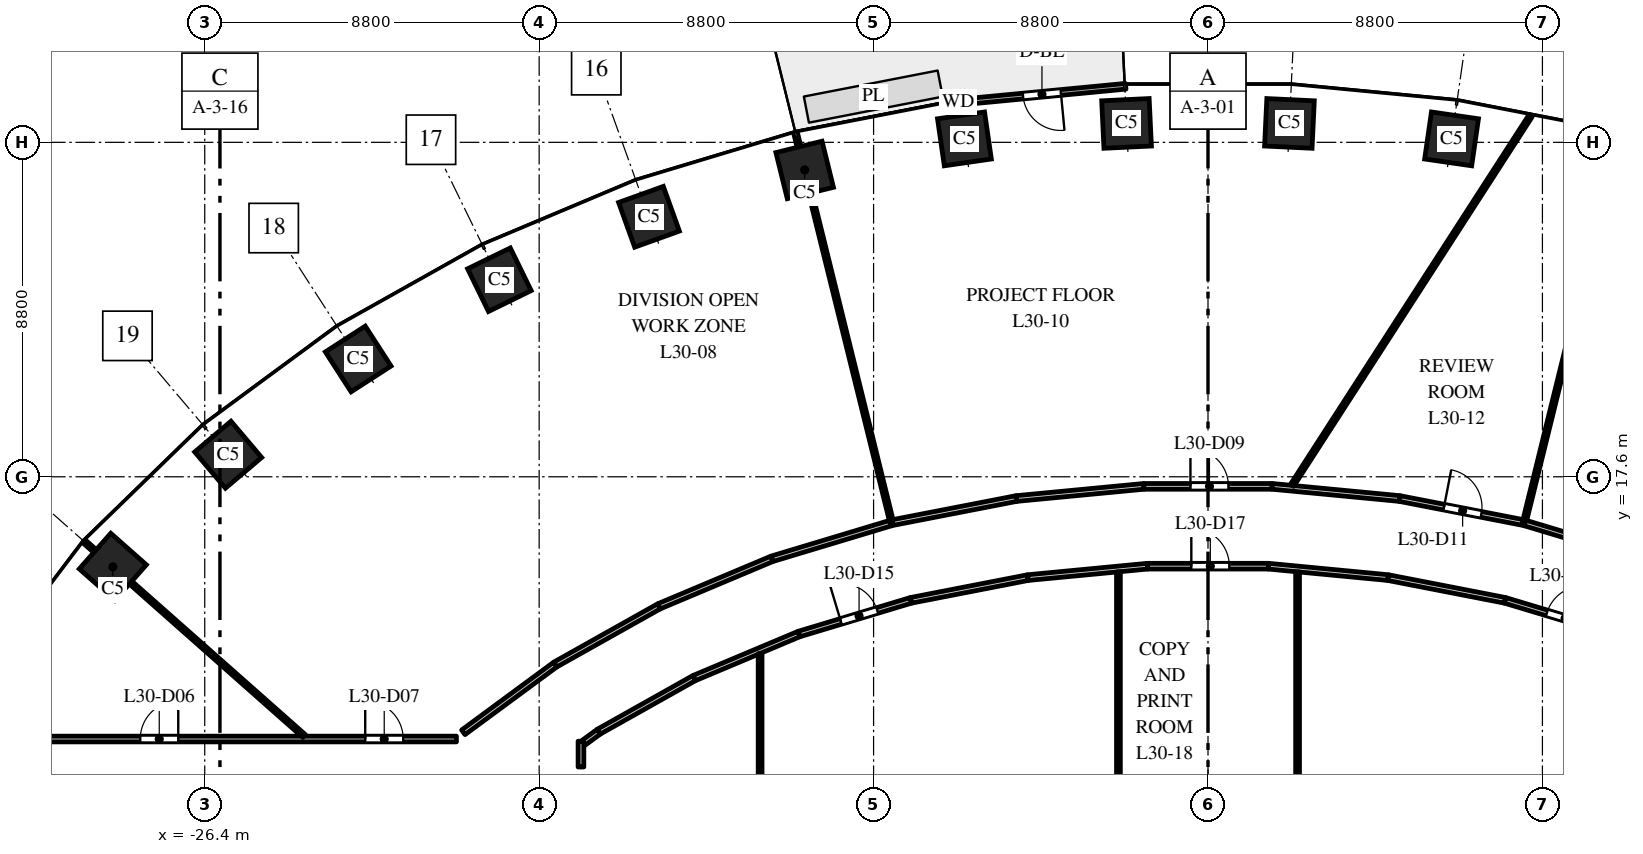
"""IFC4 building model, lengths in metres.
Left out: names, types, materials, properties, quantities, classifications, styles, units other than length and angle.
Written with IfcOpenShell. Run it as: python <this file> out.ifc"""

import sys

from ifc_helpers import new_model, si_unit, direction, frame, frame_2d, origin, origin_2d, place, context, subcontext, project, spatial, rectangle, extrude, element, fill, save


model = new_model("IFC4")
c1 = context("Model", 3, precision=1e-05, world=origin(), true_north=direction((0.0, 1.0)))
c2 = subcontext(c1, "Body", "Model", "MODEL_VIEW")
j1 = project(units=[si_unit("LENGTHUNIT", "METRE"), si_unit("PLANEANGLEUNIT", "RADIAN")], contexts=[c1])
p1 = place(None, origin())
s1 = spatial("IfcSite", under=j1, at=p1, CompositionType="ELEMENT")
p2 = place(p1, origin())
s2 = spatial("IfcBuilding", under=s1, at=p2, CompositionType="ELEMENT")
p3 = place(p2, frame((0.0, 0.0, 132.0)))
s3 = spatial("IfcBuildingStorey", under=s2, at=p3, CompositionType="ELEMENT", Elevation=132.0)
for number, where, z_axis, x_axis in (
    (1, (6.409, 26.491, 0.0), (0.0, 0.0, 1.0), (-0.99, 0.143, 0.0)),
    (2, (2.143, 26.898, 0.0), (0.0, 0.0, 1.0), (-0.999, 0.048, 0.0)),
    (3, (-2.143, 26.898, 0.0), (0.0, 0.0, 1.0), (-0.999, -0.048, 0.0)),
    (4, (-6.409, 26.491, 0.0), (0.0, 0.0, 1.0), (-0.99, -0.143, 0.0)),
    (5, (-10.613, 25.674, 0.0), (0.0, 0.0, 1.0), (-0.971, -0.24, 0.0)),
    (6, (-14.709, 24.441, 0.0), (0.0, 0.0, 1.0), (-0.941, -0.338, 0.0)),
    (7, (-18.646, 22.785, 0.0), (0.0, 0.0, 1.0), (-0.898, -0.439, 0.0)),
    (8, (-22.362, 20.7, 0.0), (0.0, 0.0, 1.0), (-0.84, -0.542, 0.0)),
    (9, (-25.783, 18.18, 0.0), (0.0, 0.0, 1.0), (-0.763, -0.646, 0.0)),
    (10, (-28.819, 15.23, 0.0), (0.0, 0.0, 1.0), (-0.663, -0.749, 0.0)),
):
    element("IfcColumn", number, at=place(p3, frame(where, z_axis=z_axis, x_axis=x_axis)), inside=s3, PredefinedType="COLUMN", context=c2, shape_type="SweptSolid", body=[
        extrude(rectangle(XDim=1.25, YDim=1.25, at=origin_2d()), origin(), (0.0, 0.0, 1.0), 4.0),
    ])
p4 = place(p3, frame((-2.166, 27.875, 0.0), z_axis=(0.0, 0.0, 1.0), x_axis=(-0.995473879823, -0.095035543824, 0.0)))
e11 = element("IfcWall", 11, at=p4, inside=s3, PredefinedType="STANDARD", context=c2, shape_type="SweptSolid", body=[
    extrude(rectangle(XDim=4.426, YDim=0.15, at=frame_2d((2.213, 0.0))), origin(), (0.0, 0.0, 1.0), 3.7),
])
p5 = place(p4, frame((1.713, 0.0, 0.0)))
e12 = element("IfcOpeningElement", 12, at=p5, cuts=e11, PredefinedType="OPENING", context=c2, shape_type="SweptSolid", body=[
    extrude(rectangle(XDim=1.0, YDim=2.4, at=frame_2d((0.5, 1.2))), frame((0.0, 0.085, 0.0), z_axis=(0.0, -1.0, 0.0), x_axis=(1.0, 0.0, 0.0)), (0.0, 0.0, 1.0), 0.17),
])
p6 = place(p3, frame((-31.5, 10.7, 0.0), z_axis=(0.0, 0.0, 1.0), x_axis=(1.0, 0.0, 0.0)))
e13 = element("IfcWall", 13, at=p6, inside=s3, PredefinedType="PARTITIONING", context=c2, shape_type="SweptSolid", body=[
    extrude(rectangle(XDim=11.723, YDim=0.15, at=frame_2d((5.861, 0.0))), origin(), (0.0, 0.0, 1.0), 3.1),
])
p7 = place(p6, frame((3.403, 0.0, 0.0)))
e14 = element("IfcOpeningElement", 14, at=p7, cuts=e13, PredefinedType="OPENING", context=c2, shape_type="SweptSolid", body=[
    extrude(rectangle(XDim=1.0, YDim=2.1, at=frame_2d((0.5, 1.05))), frame((0.0, 0.085, 0.0), z_axis=(0.0, -1.0, 0.0), x_axis=(1.0, 0.0, 0.0)), (0.0, 0.0, 1.0), 0.17),
])
p8 = place(p6, frame((9.323, 0.0, 0.0)))
e15 = element("IfcOpeningElement", 15, at=p8, cuts=e13, PredefinedType="OPENING", context=c2, shape_type="SweptSolid", body=[
    extrude(rectangle(XDim=1.0, YDim=2.1, at=frame_2d((0.5, 1.05))), frame((0.0, 0.085, 0.0), z_axis=(0.0, -1.0, 0.0), x_axis=(1.0, 0.0, 0.0)), (0.0, 0.0, 1.0), 0.17),
])
p9 = place(p3, frame((-29.569, 15.895, 0.0), z_axis=(0.0, 0.0, 1.0), x_axis=(0.748985701008, -0.662586160198, 0.0)))
e16 = element("IfcWall", 16, at=p9, inside=s3, PredefinedType="PARTITIONING", context=c2, shape_type="SweptSolid", body=[
    extrude(rectangle(XDim=7.723, YDim=0.1, at=frame_2d((3.861, 0.0))), origin(), (0.0, 0.0, 1.0), 2.9),
])
p10 = place(p3, frame((-19.595, 10.877, 0.0), z_axis=(0.0, 0.0, 1.0), x_axis=(0.805151708762, 0.593068904831, 0.0)))
e17 = element("IfcWall", 17, at=p10, inside=s3, PredefinedType="PARTITIONING", context=c2, shape_type="SweptSolid", body=[
    extrude(rectangle(XDim=3.008, YDim=0.15, at=frame_2d((1.504, 0.0))), origin(), (0.0, 0.0, 1.0), 2.75),
])
p11 = place(p3, frame((-17.173, 12.661, 0.0), z_axis=(0.0, 0.0, 1.0), x_axis=(0.872054495499, 0.489408783003, 0.0)))
e18 = element("IfcWall", 18, at=p11, inside=s3, PredefinedType="PARTITIONING", context=c2, shape_type="SweptSolid", body=[
    extrude(rectangle(XDim=3.128, YDim=0.15, at=frame_2d((1.564, 0.0))), origin(), (0.0, 0.0, 1.0), 3.7),
])
p12 = place(p3, frame((-16.5, 9.964, 0.0), z_axis=(0.0, 0.0, 1.0), x_axis=(0.0, 1.0, 0.0)))
e19 = element("IfcWall", 19, at=p12, inside=s3, PredefinedType="PARTITIONING", context=c2, shape_type="SweptSolid", body=[
    extrude(rectangle(XDim=0.678, YDim=0.15, at=frame_2d((0.339, 0.0))), origin(), (0.0, 0.0, 1.0), 3.7),
])
p13 = place(p3, frame((-16.425, 10.604, 0.0), z_axis=(0.0, 0.0, 1.0), x_axis=(0.805608867586, 0.592447763492, 0.0)))
e20 = element("IfcWall", 20, at=p13, inside=s3, PredefinedType="PARTITIONING", context=c2, shape_type="SweptSolid", body=[
    extrude(rectangle(XDim=0.488, YDim=0.15, at=frame_2d((0.244, 0.0))), origin(), (0.0, 0.0, 1.0), 3.7),
])
p14 = place(p3, frame((-16.032, 10.893, 0.0), z_axis=(0.0, 0.0, 1.0), x_axis=(0.871948863789, 0.489596955604, 0.0)))
e21 = element("IfcWall", 21, at=p14, inside=s3, PredefinedType="PARTITIONING", context=c2, shape_type="SweptSolid", body=[
    extrude(rectangle(XDim=2.88, YDim=0.15, at=frame_2d((1.44, 0.0))), origin(), (0.0, 0.0, 1.0), 2.75),
])
p15 = place(p3, frame((-14.445, 14.192, 0.0), z_axis=(0.0, 0.0, 1.0), x_axis=(0.921794929211, 0.387677841101, 0.0)))
e22 = element("IfcWall", 22, at=p15, inside=s3, PredefinedType="PARTITIONING", context=c2, shape_type="SweptSolid", body=[
    extrude(rectangle(XDim=3.224, YDim=0.15, at=frame_2d((1.612, 0.0))), origin(), (0.0, 0.0, 1.0), 2.85),
])
p16 = place(p3, frame((-13.521, 12.303, 0.0), z_axis=(0.0, 0.0, 1.0), x_axis=(0.921848667289, 0.387550041438, 0.0)))
e23 = element("IfcWall", 23, at=p16, inside=s3, PredefinedType="PARTITIONING", context=c2, shape_type="SweptSolid", body=[
    extrude(rectangle(XDim=2.993, YDim=0.15, at=frame_2d((1.497, 0.0))), origin(), (0.0, 0.0, 1.0), 2.85),
])
p17 = place(p3, frame((-11.786, -12.947, 0.0), z_axis=(0.0, 0.0, 1.0), x_axis=(0.0, 1.0, 0.0)))
e24 = element("IfcWall", 24, at=p17, inside=s3, PredefinedType="PARTITIONING", context=c2, shape_type="SweptSolid", body=[
    extrude(rectangle(XDim=25.894, YDim=0.1, at=frame_2d((12.947, 0.0))), origin(), (0.0, 0.0, 1.0), 2.75),
])
p18 = place(p3, frame((-11.473, 15.442, 0.0), z_axis=(0.0, 0.0, 1.0), x_axis=(0.957575426962, 0.288182757429, 0.0)))
e25 = element("IfcWall", 25, at=p18, inside=s3, PredefinedType="PARTITIONING", context=c2, shape_type="SweptSolid", body=[
    extrude(rectangle(XDim=3.273, YDim=0.15, at=frame_2d((1.636, 0.0))), origin(), (0.0, 0.0, 1.0), 3.7),
])
p19 = place(p3, frame((-10.853, 26.646, 0.0), z_axis=(0.0, 0.0, 1.0), x_axis=(0.239771193985, -0.970829426076, 0.0)))
e26 = element("IfcWall", 26, at=p19, inside=s3, PredefinedType="PARTITIONING", context=c2, shape_type="SweptSolid", body=[
    extrude(rectangle(XDim=10.56, YDim=0.1, at=frame_2d((5.28, 0.0))), origin(), (0.0, 0.0, 1.0), 2.85),
])
p20 = place(p3, frame((-10.762, 13.463, 0.0), z_axis=(0.0, 0.0, 1.0), x_axis=(0.957609782402, 0.288068576292, 0.0)))
e27 = element("IfcWall", 27, at=p20, inside=s3, PredefinedType="PARTITIONING", context=c2, shape_type="SweptSolid", body=[
    extrude(rectangle(XDim=3.076, YDim=0.15, at=frame_2d((1.538, 0.0))), origin(), (0.0, 0.0, 1.0), 3.7),
])
p21 = place(p20, frame((1.15, 0.0, 0.0)))
e28 = element("IfcOpeningElement", 28, at=p21, cuts=e27, PredefinedType="OPENING", context=c2, shape_type="SweptSolid", body=[
    extrude(rectangle(XDim=1.0, YDim=2.1, at=frame_2d((0.5, 1.05))), frame((0.0, 0.085, 0.0), z_axis=(0.0, -1.0, 0.0), x_axis=(1.0, 0.0, 0.0)), (0.0, 0.0, 1.0), 0.17),
])
p22 = place(p3, frame((-8.301, 16.395, 0.0), z_axis=(0.0, 0.0, 1.0), x_axis=(0.98166242116, 0.19062762361, 0.0)))
e29 = element("IfcWall", 29, at=p22, inside=s3, PredefinedType="PARTITIONING", context=c2, shape_type="SweptSolid", body=[
    extrude(rectangle(XDim=3.321, YDim=0.15, at=frame_2d((1.66, 0.0))), origin(), (0.0, 0.0, 1.0), 2.85),
])
p23 = place(p3, frame((-7.816, 14.349, 0.0), z_axis=(0.0, 0.0, 1.0), x_axis=(0.981627147181, 0.190809181955, 0.0)))
e30 = element("IfcWall", 30, at=p23, inside=s3, PredefinedType="PARTITIONING", context=c2, shape_type="SweptSolid", body=[
    extrude(rectangle(XDim=3.134, YDim=0.15, at=frame_2d((1.567, 0.0))), origin(), (0.0, 0.0, 1.0), 2.85),
])
p24 = place(p3, frame((-5.041, 17.028, 0.0), z_axis=(0.0, 0.0, 1.0), x_axis=(0.99548178004, 0.094952754613, 0.0)))
e31 = element("IfcWall", 31, at=p24, inside=s3, PredefinedType="PARTITIONING", context=c2, shape_type="SweptSolid", body=[
    extrude(rectangle(XDim=3.368, YDim=0.15, at=frame_2d((1.684, 0.0))), origin(), (0.0, 0.0, 1.0), 3.7),
])
p25 = place(p3, frame((-4.74, 14.947, 0.0), z_axis=(0.0, 0.0, 1.0), x_axis=(0.995467349369, 0.095103923894, 0.0)))
e32 = element("IfcWall", 32, at=p25, inside=s3, PredefinedType="PARTITIONING", context=c2, shape_type="SweptSolid", body=[
    extrude(rectangle(XDim=3.165, YDim=0.15, at=frame_2d((1.583, 0.0))), origin(), (0.0, 0.0, 1.0), 3.7),
])
p26 = place(p3, frame((-2.357, 7.21, 0.0), z_axis=(0.0, 0.0, 1.0), x_axis=(0.0, 1.0, 0.0)))
e33 = element("IfcWall", 33, at=p26, inside=s3, PredefinedType="PARTITIONING", context=c2, shape_type="SweptSolid", body=[
    extrude(rectangle(XDim=7.886, YDim=0.1, at=frame_2d((3.943, 0.0))), origin(), (0.0, 0.0, 1.0), 2.9),
])
p27 = place(p3, frame((-1.688, 17.348, 0.0), z_axis=(0.0, 0.0, 1.0), x_axis=(1.0, 0.0, 0.0)))
e34 = element("IfcWall", 34, at=p27, inside=s3, PredefinedType="PARTITIONING", context=c2, shape_type="SweptSolid", body=[
    extrude(rectangle(XDim=3.376, YDim=0.15, at=frame_2d((1.688, 0.0))), origin(), (0.0, 0.0, 1.0), 2.85),
])
p28 = place(p27, frame((1.226, 0.0, 0.0)))
e35 = element("IfcOpeningElement", 35, at=p28, cuts=e34, PredefinedType="OPENING", context=c2, shape_type="SweptSolid", body=[
    extrude(rectangle(XDim=1.0, YDim=2.1, at=frame_2d((0.5, 1.05))), frame((0.0, 0.085, 0.0), z_axis=(0.0, -1.0, 0.0), x_axis=(1.0, 0.0, 0.0)), (0.0, 0.0, 1.0), 0.17),
])
p29 = place(p3, frame((-1.589, 15.248, 0.0), z_axis=(0.0, 0.0, 1.0), x_axis=(1.0, 0.0, 0.0)))
e36 = element("IfcWall", 36, at=p29, inside=s3, PredefinedType="PARTITIONING", context=c2, shape_type="SweptSolid", body=[
    extrude(rectangle(XDim=3.178, YDim=0.15, at=frame_2d((1.589, 0.0))), origin(), (0.0, 0.0, 1.0), 2.85),
])
p30 = place(p29, frame((1.15, 0.0, 0.0)))
e37 = element("IfcOpeningElement", 37, at=p30, cuts=e36, PredefinedType="OPENING", context=c2, shape_type="SweptSolid", body=[
    extrude(rectangle(XDim=1.0, YDim=2.1, at=frame_2d((0.5, 1.05))), frame((0.0, 0.085, 0.0), z_axis=(0.0, -1.0, 0.0), x_axis=(1.0, 0.0, 0.0)), (0.0, 0.0, 1.0), 0.17),
])
p31 = place(p3, frame((1.589, 15.248, 0.0), z_axis=(0.0, 0.0, 1.0), x_axis=(0.995467349369, -0.095103923894, 0.0)))
e38 = element("IfcWall", 38, at=p31, inside=s3, PredefinedType="PARTITIONING", context=c2, shape_type="SweptSolid", body=[
    extrude(rectangle(XDim=3.165, YDim=0.15, at=frame_2d((1.583, 0.0))), origin(), (0.0, 0.0, 1.0), 2.85),
])
p32 = place(p3, frame((1.688, 17.348, 0.0), z_axis=(0.0, 0.0, 1.0), x_axis=(0.99548178004, -0.094952754613, 0.0)))
e39 = element("IfcWall", 39, at=p32, inside=s3, PredefinedType="PARTITIONING", context=c2, shape_type="SweptSolid", body=[
    extrude(rectangle(XDim=3.368, YDim=0.15, at=frame_2d((1.684, 0.0))), origin(), (0.0, 0.0, 1.0), 2.85),
])
p33 = place(p3, frame((2.212, 17.374, 0.0), z_axis=(0.0, 0.0, 1.0), x_axis=(0.542286762482, 0.840193470123, 0.0)))
e40 = element("IfcWall", 40, at=p33, inside=s3, PredefinedType="PARTITIONING", context=c2, shape_type="SweptSolid", body=[
    extrude(rectangle(XDim=11.581, YDim=0.1, at=frame_2d((5.79, 0.0))), origin(), (0.0, 0.0, 1.0), 2.85),
])
p34 = place(p3, frame((2.357, 7.21, 0.0), z_axis=(0.0, 0.0, 1.0), x_axis=(0.0, 1.0, 0.0)))
e41 = element("IfcWall", 41, at=p34, inside=s3, PredefinedType="PARTITIONING", context=c2, shape_type="SweptSolid", body=[
    extrude(rectangle(XDim=7.886, YDim=0.1, at=frame_2d((3.943, 0.0))), origin(), (0.0, 0.0, 1.0), 2.85),
])
p35 = place(p3, frame((4.74, 14.947, 0.0), z_axis=(0.0, 0.0, 1.0), x_axis=(0.981627147181, -0.190809181955, 0.0)))
e42 = element("IfcWall", 42, at=p35, inside=s3, PredefinedType="PARTITIONING", context=c2, shape_type="SweptSolid", body=[
    extrude(rectangle(XDim=3.134, YDim=0.15, at=frame_2d((1.567, 0.0))), origin(), (0.0, 0.0, 1.0), 3.7),
])
p36 = place(p3, frame((5.041, 17.028, 0.0), z_axis=(0.0, 0.0, 1.0), x_axis=(0.98166242116, -0.19062762361, 0.0)))
e43 = element("IfcWall", 43, at=p36, inside=s3, PredefinedType="PARTITIONING", context=c2, shape_type="SweptSolid", body=[
    extrude(rectangle(XDim=3.321, YDim=0.15, at=frame_2d((1.66, 0.0))), origin(), (0.0, 0.0, 1.0), 3.7),
])
p37 = place(p36, frame((1.19, 0.0, 0.0)))
e44 = element("IfcOpeningElement", 44, at=p37, cuts=e43, PredefinedType="OPENING", context=c2, shape_type="SweptSolid", body=[
    extrude(rectangle(XDim=1.0, YDim=2.1, at=frame_2d((0.5, 1.05))), frame((0.0, 0.085, 0.0), z_axis=(0.0, -1.0, 0.0), x_axis=(1.0, 0.0, 0.0)), (0.0, 0.0, 1.0), 0.17),
])
p38 = place(p3, frame((7.816, 14.349, 0.0), z_axis=(0.0, 0.0, 1.0), x_axis=(0.957609782402, -0.288068576292, 0.0)))
e45 = element("IfcWall", 45, at=p38, inside=s3, PredefinedType="PARTITIONING", context=c2, shape_type="SweptSolid", body=[
    extrude(rectangle(XDim=3.076, YDim=0.15, at=frame_2d((1.538, 0.0))), origin(), (0.0, 0.0, 1.0), 2.85),
])
p39 = place(p38, frame((1.15, 0.0, 0.0)))
e46 = element("IfcOpeningElement", 46, at=p39, cuts=e45, PredefinedType="OPENING", context=c2, shape_type="SweptSolid", body=[
    extrude(rectangle(XDim=1.0, YDim=2.1, at=frame_2d((0.5, 1.05))), frame((0.0, 0.085, 0.0), z_axis=(0.0, -1.0, 0.0), x_axis=(1.0, 0.0, 0.0)), (0.0, 0.0, 1.0), 0.17),
])
p40 = place(p3, frame((8.321, 16.394, 0.0), z_axis=(0.0, 0.0, 1.0), x_axis=(0.239771193985, 0.970829426076, 0.0)))
e47 = element("IfcWall", 47, at=p40, inside=s3, PredefinedType="PARTITIONING", context=c2, shape_type="SweptSolid", body=[
    extrude(rectangle(XDim=10.56, YDim=0.1, at=frame_2d((5.28, 0.0))), origin(), (0.0, 0.0, 1.0), 2.9),
])
p41 = place(p3, frame((8.339, 16.385, 0.0), z_axis=(0.0, 0.0, 1.0), x_axis=(0.957575426962, -0.288182757429, 0.0)))
e48 = element("IfcWall", 48, at=p41, inside=s3, PredefinedType="PARTITIONING", context=c2, shape_type="SweptSolid", body=[
    extrude(rectangle(XDim=3.273, YDim=0.15, at=frame_2d((1.636, 0.0))), origin(), (0.0, 0.0, 1.0), 2.85),
])
p42 = place(p5, origin())
e49 = element("IfcDoor", 49, at=p42, inside=s3, OperationType="SINGLE_SWING_LEFT", PredefinedType="DOOR", context=c2, shape_type="SweptSolid", body=[
    extrude(rectangle(XDim=1.0, YDim=2.4, at=frame_2d((0.5, 1.2))), frame((0.0, 0.025, 0.0), z_axis=(0.0, -1.0, 0.0), x_axis=(1.0, 0.0, 0.0)), (0.0, 0.0, 1.0), 0.05),
])
fill(e12, e49)
p43 = place(p7, origin())
e50 = element("IfcDoor", 50, at=p43, inside=s3, OperationType="SINGLE_SWING_RIGHT", PredefinedType="DOOR", context=c2, shape_type="SweptSolid", body=[
    extrude(rectangle(XDim=1.0, YDim=2.1, at=frame_2d((0.5, 1.05))), frame((0.0, 0.025, 0.0), z_axis=(0.0, -1.0, 0.0), x_axis=(1.0, 0.0, 0.0)), (0.0, 0.0, 1.0), 0.05),
])
fill(e14, e50)
p44 = place(p8, origin())
e51 = element("IfcDoor", 51, at=p44, inside=s3, OperationType="SINGLE_SWING_LEFT", PredefinedType="DOOR", context=c2, shape_type="SweptSolid", body=[
    extrude(rectangle(XDim=1.0, YDim=2.1, at=frame_2d((0.5, 1.05))), frame((0.0, 0.025, 0.0), z_axis=(0.0, -1.0, 0.0), x_axis=(1.0, 0.0, 0.0)), (0.0, 0.0, 1.0), 0.05),
])
fill(e15, e51)
p45 = place(p28, origin())
e52 = element("IfcDoor", 52, at=p45, inside=s3, OperationType="SINGLE_SWING_LEFT", PredefinedType="DOOR", context=c2, shape_type="SweptSolid", body=[
    extrude(rectangle(XDim=1.0, YDim=2.1, at=frame_2d((0.5, 1.05))), frame((0.0, 0.025, 0.0), z_axis=(0.0, -1.0, 0.0), x_axis=(1.0, 0.0, 0.0)), (0.0, 0.0, 1.0), 0.05),
])
fill(e35, e52)
p46 = place(p37, origin())
e53 = element("IfcDoor", 53, at=p46, inside=s3, OperationType="SINGLE_SWING_LEFT", PredefinedType="DOOR", context=c2, shape_type="SweptSolid", body=[
    extrude(rectangle(XDim=1.0, YDim=2.1, at=frame_2d((0.5, 1.05))), frame((0.0, 0.025, 0.0), z_axis=(0.0, -1.0, 0.0), x_axis=(1.0, 0.0, 0.0)), (0.0, 0.0, 1.0), 0.05),
])
fill(e44, e53)
p47 = place(p21, origin())
e54 = element("IfcDoor", 54, at=p47, inside=s3, OperationType="SINGLE_SWING_LEFT", PredefinedType="DOOR", context=c2, shape_type="SweptSolid", body=[
    extrude(rectangle(XDim=1.0, YDim=2.1, at=frame_2d((0.5, 1.05))), frame((0.0, 0.025, 0.0), z_axis=(0.0, -1.0, 0.0), x_axis=(1.0, 0.0, 0.0)), (0.0, 0.0, 1.0), 0.05),
])
fill(e28, e54)
p48 = place(p30, origin())
e55 = element("IfcDoor", 55, at=p48, inside=s3, OperationType="SINGLE_SWING_LEFT", PredefinedType="DOOR", context=c2, shape_type="SweptSolid", body=[
    extrude(rectangle(XDim=1.0, YDim=2.1, at=frame_2d((0.5, 1.05))), frame((0.0, 0.025, 0.0), z_axis=(0.0, -1.0, 0.0), x_axis=(1.0, 0.0, 0.0)), (0.0, 0.0, 1.0), 0.05),
])
fill(e37, e55)
p49 = place(p39, origin())
e56 = element("IfcDoor", 56, at=p49, inside=s3, OperationType="SINGLE_SWING_RIGHT", PredefinedType="DOOR", context=c2, shape_type="SweptSolid", body=[
    extrude(rectangle(XDim=1.0, YDim=2.1, at=frame_2d((0.5, 1.05))), frame((0.0, 0.025, 0.0), z_axis=(0.0, -1.0, 0.0), x_axis=(1.0, 0.0, 0.0)), (0.0, 0.0, 1.0), 0.05),
])
fill(e46, e56)
save(model, sys.argv[1])
